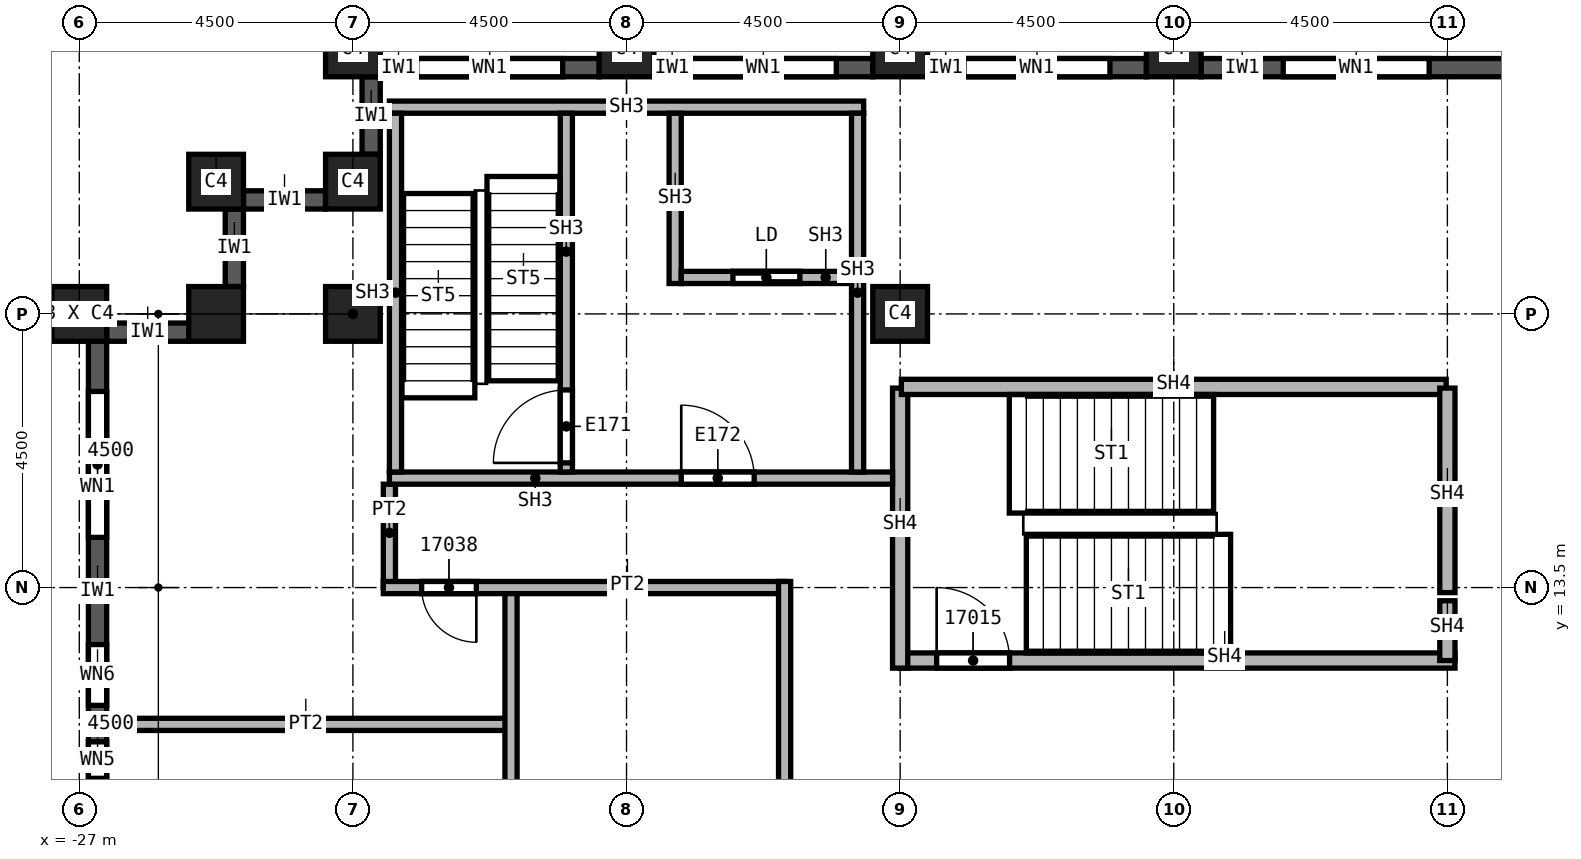
"""IFC4 building model, lengths in metres.
Left out: names, types, materials, properties, quantities, classifications, styles, units other than length and angle.
Written with IfcOpenShell. Run it as: python <this file> out.ifc"""

import sys

from ifc_helpers import new_model, si_unit, direction, frame, frame_2d, origin, origin_2d, place, context, subcontext, project, spatial, rectangle, extrude, element, fill, save


model = new_model("IFC4")
c1 = context("Model", 3, precision=1e-05, world=origin(), true_north=direction((0.0, 1.0)))
c2 = subcontext(c1, "Body", "Model", "MODEL_VIEW")
j1 = project(units=[si_unit("LENGTHUNIT", "METRE"), si_unit("PLANEANGLEUNIT", "RADIAN")], contexts=[c1])
p1 = place(None, origin())
s1 = spatial("IfcSite", under=j1, at=p1, CompositionType="ELEMENT")
p2 = place(p1, origin())
s2 = spatial("IfcBuilding", under=s1, at=p2, CompositionType="ELEMENT")
p3 = place(p2, frame((0.0, 0.0, 254.0)))
s3 = spatial("IfcBuildingStorey", under=s2, at=p3, CompositionType="ELEMENT", Elevation=254.0)
for number, where, z_axis, x_axis in (
    (1, (-13.5, 18.0, 0.0), (0.0, 0.0, 1.0), (1.0, 0.0, 0.0)),
    (2, (-22.5, 18.0, 0.0), (0.0, 0.0, 1.0), (1.0, 0.0, 0.0)),
    (3, (-9.0, 22.35, 0.0), (0.0, 0.0, 1.0), (1.0, 0.0, 0.0)),
    (4, (-13.5, 22.35, 0.0), (0.0, 0.0, 1.0), (1.0, 0.0, 0.0)),
    (5, (-18.0, 22.35, 0.0), (0.0, 0.0, 1.0), (1.0, 0.0, 0.0)),
    (6, (-22.5, 22.35, 0.0), (0.0, 0.0, 1.0), (1.0, 0.0, 0.0)),
    (7, (-27.0, 18.0, 0.0), (0.0, 0.0, 1.0), (0.0, 1.0, 0.0)),
    (8, (-22.5, 20.175, 0.0), (0.0, 0.0, 1.0), (1.0, 0.0, 0.0)),
    (9, (-24.75, 20.175, 0.0), (0.0, 0.0, 1.0), (1.0, 0.0, 0.0)),
    (10, (-24.75, 18.0, 0.0), (0.0, 0.0, 1.0), (1.0, 0.0, 0.0)),
):
    element("IfcColumn", number, at=place(p3, frame(where, z_axis=z_axis, x_axis=x_axis)), inside=s3, PredefinedType="COLUMN", context=c2, shape_type="SweptSolid", body=[
        extrude(rectangle(XDim=0.9, YDim=0.9, at=origin_2d()), origin(), (0.0, 0.0, 1.0), 3.72),
    ])
p4 = place(p3, frame((-24.45, 19.725, 0.0), z_axis=(0.0, 0.0, 1.0), x_axis=(0.0, -1.0, 0.0)))
e11 = element("IfcWall", 11, at=p4, inside=s3, PredefinedType="SOLIDWALL", context=c2, shape_type="SweptSolid", body=[
    extrude(rectangle(XDim=1.275, YDim=0.3, at=frame_2d((0.638, 0.0))), origin(), (0.0, 0.0, 1.0), 3.12),
])
p5 = place(p3, frame((-25.2, 17.7, 0.0), z_axis=(0.0, 0.0, 1.0), x_axis=(-1.0, 0.0, 0.0)))
e12 = element("IfcWall", 12, at=p5, inside=s3, PredefinedType="SOLIDWALL", context=c2, shape_type="SweptSolid", body=[
    extrude(rectangle(XDim=1.35, YDim=0.3, at=frame_2d((0.675, 0.0))), origin(), (0.0, 0.0, 1.0), 3.12),
])
p6 = place(p3, frame((-26.7, 17.55, 0.0), z_axis=(0.0, 0.0, 1.0), x_axis=(0.0, -1.0, 0.0)))
e13 = element("IfcWall", 13, at=p6, inside=s3, PredefinedType="SOLIDWALL", context=c2, shape_type="SweptSolid", body=[
    extrude(rectangle(XDim=8.1, YDim=0.3, at=frame_2d((4.05, 0.0))), origin(), (0.0, 0.0, 1.0), 3.12),
])
p7 = place(p6, frame((0.825, 0.0, 0.8)))
e14 = element("IfcOpeningElement", 14, at=p7, cuts=e13, PredefinedType="OPENING", context=c2, shape_type="SweptSolid", body=[
    extrude(rectangle(XDim=2.4, YDim=1.95, at=frame_2d((1.2, 0.975))), frame((0.0, 0.15, 0.0), z_axis=(0.0, -1.0, 0.0), x_axis=(1.0, 0.0, 0.0)), (0.0, 0.0, 1.0), 0.3),
])
p8 = place(p6, frame((4.988, 0.0, 0.8)))
e15 = element("IfcOpeningElement", 15, at=p8, cuts=e13, PredefinedType="OPENING", context=c2, shape_type="SweptSolid", body=[
    extrude(rectangle(XDim=1.0, YDim=1.95, at=frame_2d((0.5, 0.975))), frame((0.0, 0.15, 0.0), z_axis=(0.0, -1.0, 0.0), x_axis=(1.0, 0.0, 0.0)), (0.0, 0.0, 1.0), 0.3),
])
p9 = place(p6, frame((6.587, 0.0, 0.8)))
e16 = element("IfcOpeningElement", 16, at=p9, cuts=e13, PredefinedType="OPENING", context=c2, shape_type="SweptSolid", body=[
    extrude(rectangle(XDim=0.6, YDim=1.95, at=frame_2d((0.3, 0.975))), frame((0.0, 0.15, 0.0), z_axis=(0.0, -1.0, 0.0), x_axis=(1.0, 0.0, 0.0)), (0.0, 0.0, 1.0), 0.3),
])
p10 = place(p3, frame((-3.45, 22.05, 0.0), z_axis=(0.0, 0.0, 1.0), x_axis=(-1.0, 0.0, 0.0)))
e17 = element("IfcWall", 17, at=p10, inside=s3, PredefinedType="SOLIDWALL", context=c2, shape_type="SweptSolid", body=[
    extrude(rectangle(XDim=5.1, YDim=0.3, at=frame_2d((2.55, 0.0))), origin(), (0.0, 0.0, 1.0), 3.12),
])
p11 = place(p10, frame((1.35, 0.0, 0.8)))
e18 = element("IfcOpeningElement", 18, at=p11, cuts=e17, PredefinedType="OPENING", context=c2, shape_type="SweptSolid", body=[
    extrude(rectangle(XDim=2.4, YDim=1.95, at=frame_2d((1.2, 0.975))), frame((0.0, 0.15, 0.0), z_axis=(0.0, -1.0, 0.0), x_axis=(1.0, 0.0, 0.0)), (0.0, 0.0, 1.0), 0.3),
])
p12 = place(p3, frame((-9.45, 22.05, 0.0), z_axis=(0.0, 0.0, 1.0), x_axis=(-1.0, 0.0, 0.0)))
e19 = element("IfcWall", 19, at=p12, inside=s3, PredefinedType="SOLIDWALL", context=c2, shape_type="SweptSolid", body=[
    extrude(rectangle(XDim=3.6, YDim=0.3, at=frame_2d((1.8, 0.0))), origin(), (0.0, 0.0, 1.0), 3.12),
])
p13 = place(p12, frame((0.6, 0.0, 0.8)))
e20 = element("IfcOpeningElement", 20, at=p13, cuts=e19, PredefinedType="OPENING", context=c2, shape_type="SweptSolid", body=[
    extrude(rectangle(XDim=2.4, YDim=1.95, at=frame_2d((1.2, 0.975))), frame((0.0, 0.15, 0.0), z_axis=(0.0, -1.0, 0.0), x_axis=(1.0, 0.0, 0.0)), (0.0, 0.0, 1.0), 0.3),
])
p14 = place(p3, frame((-13.95, 22.05, 0.0), z_axis=(0.0, 0.0, 1.0), x_axis=(-1.0, 0.0, 0.0)))
e21 = element("IfcWall", 21, at=p14, inside=s3, PredefinedType="SOLIDWALL", context=c2, shape_type="SweptSolid", body=[
    extrude(rectangle(XDim=3.6, YDim=0.3, at=frame_2d((1.8, 0.0))), origin(), (0.0, 0.0, 1.0), 3.12),
])
p15 = place(p14, frame((0.6, 0.0, 0.8)))
e22 = element("IfcOpeningElement", 22, at=p15, cuts=e21, PredefinedType="OPENING", context=c2, shape_type="SweptSolid", body=[
    extrude(rectangle(XDim=2.4, YDim=1.95, at=frame_2d((1.2, 0.975))), frame((0.0, 0.15, 0.0), z_axis=(0.0, -1.0, 0.0), x_axis=(1.0, 0.0, 0.0)), (0.0, 0.0, 1.0), 0.3),
])
p16 = place(p3, frame((-18.45, 22.05, 0.0), z_axis=(0.0, 0.0, 1.0), x_axis=(-1.0, 0.0, 0.0)))
e23 = element("IfcWall", 23, at=p16, inside=s3, PredefinedType="SOLIDWALL", context=c2, shape_type="SweptSolid", body=[
    extrude(rectangle(XDim=3.6, YDim=0.3, at=frame_2d((1.8, 0.0))), origin(), (0.0, 0.0, 1.0), 3.12),
])
p17 = place(p16, frame((0.6, 0.0, 0.8)))
e24 = element("IfcOpeningElement", 24, at=p17, cuts=e23, PredefinedType="OPENING", context=c2, shape_type="SweptSolid", body=[
    extrude(rectangle(XDim=2.4, YDim=1.95, at=frame_2d((1.2, 0.975))), frame((0.0, 0.15, 0.0), z_axis=(0.0, -1.0, 0.0), x_axis=(1.0, 0.0, 0.0)), (0.0, 0.0, 1.0), 0.3),
])
p18 = place(p3, frame((-22.2, 21.9, 0.0), z_axis=(0.0, 0.0, 1.0), x_axis=(0.0, -1.0, 0.0)))
e25 = element("IfcWall", 25, at=p18, inside=s3, PredefinedType="SOLIDWALL", context=c2, shape_type="SweptSolid", body=[
    extrude(rectangle(XDim=1.275, YDim=0.3, at=frame_2d((0.637, 0.0))), origin(), (0.0, 0.0, 1.0), 3.12),
])
p19 = place(p3, frame((-22.95, 19.875, 0.0), z_axis=(0.0, 0.0, 1.0), x_axis=(-1.0, 0.0, 0.0)))
e26 = element("IfcWall", 26, at=p19, inside=s3, PredefinedType="SOLIDWALL", context=c2, shape_type="SweptSolid", body=[
    extrude(rectangle(XDim=1.35, YDim=0.3, at=frame_2d((0.675, 0.0))), origin(), (0.0, 0.0, 1.0), 3.12),
])
p20 = place(p3, frame((-26.55, 11.25, 0.0), z_axis=(0.0, 0.0, 1.0), x_axis=(1.0, 0.0, 0.0)))
e27 = element("IfcWall", 27, at=p20, inside=s3, PredefinedType="PARTITIONING", context=c2, shape_type="SweptSolid", body=[
    extrude(rectangle(XDim=6.65, YDim=0.2, at=frame_2d((3.325, 0.0))), origin(), (0.0, 0.0, 1.0), 3.72),
])
p21 = place(p3, frame((-21.9, 13.5, 0.0), z_axis=(0.0, 0.0, 1.0), x_axis=(0.0, 1.0, 0.0)))
e28 = element("IfcWall", 28, at=p21, inside=s3, PredefinedType="PARTITIONING", context=c2, shape_type="SweptSolid", body=[
    extrude(rectangle(XDim=1.7, YDim=0.2, at=frame_2d((0.85, 0.0))), origin(), (0.0, 0.0, 1.0), 3.72),
])
p22 = place(p3, frame((-19.9, -13.5, 0.0), z_axis=(0.0, 0.0, 1.0), x_axis=(0.0, 1.0, 0.0)))
e29 = element("IfcWall", 29, at=p22, inside=s3, PredefinedType="PARTITIONING", context=c2, shape_type="SweptSolid", body=[
    extrude(rectangle(XDim=27.0, YDim=0.2, at=frame_2d((13.5, 0.0))), origin(), (0.0, 0.0, 1.0), 3.72),
])
p23 = place(p22, frame((21.3, 0.0, 0.0)))
e30 = element("IfcOpeningElement", 30, at=p23, cuts=e29, PredefinedType="OPENING", context=c2, shape_type="SweptSolid", body=[
    extrude(rectangle(XDim=1.0, YDim=2.1, at=frame_2d((0.5, 1.05))), frame((0.0, 0.1, 0.0), z_axis=(0.0, -1.0, 0.0), x_axis=(1.0, 0.0, 0.0)), (0.0, 0.0, 1.0), 0.2),
])
p24 = place(p22, frame((0.25, 0.0, 0.0)))
e31 = element("IfcOpeningElement", 31, at=p24, cuts=e29, PredefinedType="OPENING", context=c2, shape_type="SweptSolid", body=[
    extrude(rectangle(XDim=1.0, YDim=2.1, at=frame_2d((0.5, 1.05))), frame((0.0, 0.1, 0.0), z_axis=(0.0, -1.0, 0.0), x_axis=(1.0, 0.0, 0.0)), (0.0, 0.0, 1.0), 0.2),
])
p25 = place(p3, frame((-15.4, 13.5, 0.0), z_axis=(0.0, 0.0, 1.0), x_axis=(-1.0, 0.0, 0.0)))
e32 = element("IfcWall", 32, at=p25, inside=s3, PredefinedType="PARTITIONING", context=c2, shape_type="SweptSolid", body=[
    extrude(rectangle(XDim=6.6, YDim=0.2, at=frame_2d((3.3, 0.0))), origin(), (0.0, 0.0, 1.0), 3.72),
])
p26 = place(p25, frame((5.07, 0.0, 0.0)))
e33 = element("IfcOpeningElement", 33, at=p26, cuts=e32, PredefinedType="OPENING", context=c2, shape_type="SweptSolid", body=[
    extrude(rectangle(XDim=0.9, YDim=2.1, at=frame_2d((0.45, 1.05))), frame((0.0, 0.1, 0.0), z_axis=(0.0, -1.0, 0.0), x_axis=(1.0, 0.0, 0.0)), (0.0, 0.0, 1.0), 0.2),
])
p27 = place(p3, frame((-15.4, -21.9, 0.0), z_axis=(0.0, 0.0, 1.0), x_axis=(0.0, 1.0, 0.0)))
e34 = element("IfcWall", 34, at=p27, inside=s3, PredefinedType="PARTITIONING", context=c2, shape_type="SweptSolid", body=[
    extrude(rectangle(XDim=35.5, YDim=0.2, at=frame_2d((17.75, 0.0))), origin(), (0.0, 0.0, 1.0), 3.72),
])
p28 = place(p27, frame((24.3, 0.0, 0.0)))
e35 = element("IfcOpeningElement", 35, at=p28, cuts=e34, PredefinedType="OPENING", context=c2, shape_type="SweptSolid", body=[
    extrude(rectangle(XDim=1.0, YDim=2.1, at=frame_2d((0.5, 1.05))), frame((0.0, 0.1, 0.0), z_axis=(0.0, -1.0, 0.0), x_axis=(1.0, 0.0, 0.0)), (0.0, 0.0, 1.0), 0.2),
])
p29 = place(p27, frame((2.35, 0.0, 0.0)))
e36 = element("IfcOpeningElement", 36, at=p29, cuts=e34, PredefinedType="OPENING", context=c2, shape_type="SweptSolid", body=[
    extrude(rectangle(XDim=1.0, YDim=2.1, at=frame_2d((0.5, 1.05))), frame((0.0, 0.1, 0.0), z_axis=(0.0, -1.0, 0.0), x_axis=(1.0, 0.0, 0.0)), (0.0, 0.0, 1.0), 0.2),
])
p30 = place(p27, frame((5.7, 0.0, 0.0)))
e37 = element("IfcOpeningElement", 37, at=p30, cuts=e34, PredefinedType="OPENING", context=c2, shape_type="SweptSolid", body=[
    extrude(rectangle(XDim=1.0, YDim=2.1, at=frame_2d((0.5, 1.05))), frame((0.0, 0.1, 0.0), z_axis=(0.0, -1.0, 0.0), x_axis=(1.0, 0.0, 0.0)), (0.0, 0.0, 1.0), 0.2),
])
p31 = place(p27, frame((10.35, 0.0, 0.0)))
e38 = element("IfcOpeningElement", 38, at=p31, cuts=e34, PredefinedType="OPENING", context=c2, shape_type="SweptSolid", body=[
    extrude(rectangle(XDim=1.0, YDim=2.1, at=frame_2d((0.5, 1.05))), frame((0.0, 0.1, 0.0), z_axis=(0.0, -1.0, 0.0), x_axis=(1.0, 0.0, 0.0)), (0.0, 0.0, 1.0), 0.2),
])
p32 = place(p27, frame((16.2, 0.0, 0.0)))
e39 = element("IfcOpeningElement", 39, at=p32, cuts=e34, PredefinedType="OPENING", context=c2, shape_type="SweptSolid", body=[
    extrude(rectangle(XDim=1.0, YDim=2.1, at=frame_2d((0.5, 1.05))), frame((0.0, 0.1, 0.0), z_axis=(0.0, -1.0, 0.0), x_axis=(1.0, 0.0, 0.0)), (0.0, 0.0, 1.0), 0.2),
])
p33 = place(p3, frame((-13.5, 12.3, 0.0), z_axis=(0.0, 0.0, 1.0), x_axis=(1.0, 0.0, 0.0)))
e40 = element("IfcWall", 40, at=p33, inside=s3, PredefinedType="SOLIDWALL", context=c2, shape_type="SweptSolid", body=[
    extrude(rectangle(XDim=9.125, YDim=0.25, at=frame_2d((4.562, 0.0))), origin(), (0.0, 0.0, 1.0), 3.72),
])
p34 = place(p33, frame((0.6, 0.0, 0.0)))
e41 = element("IfcOpeningElement", 41, at=p34, cuts=e40, PredefinedType="OPENING", context=c2, shape_type="SweptSolid", body=[
    extrude(rectangle(XDim=1.2, YDim=2.1, at=frame_2d((0.6, 1.05))), frame((0.0, 0.125, 0.0), z_axis=(0.0, -1.0, 0.0), x_axis=(1.0, 0.0, 0.0)), (0.0, 0.0, 1.0), 0.25),
])
p35 = place(p3, frame((-13.5, 16.78, 0.0), z_axis=(0.0, 0.0, 1.0), x_axis=(0.0, -1.0, 0.0)))
e42 = element("IfcWall", 42, at=p35, inside=s3, PredefinedType="SOLIDWALL", context=c2, shape_type="SweptSolid", body=[
    extrude(rectangle(XDim=4.605, YDim=0.25, at=frame_2d((2.302, 0.0))), origin(), (0.0, 0.0, 1.0), 3.72),
])
p36 = place(p3, frame((-13.48, 16.8, 0.0), z_axis=(0.0, 0.0, 1.0), x_axis=(1.0, 0.0, 0.0)))
e43 = element("IfcWall", 43, at=p36, inside=s3, PredefinedType="SOLIDWALL", context=c2, shape_type="SweptSolid", body=[
    extrude(rectangle(XDim=8.96, YDim=0.25, at=frame_2d((4.48, 0.0))), origin(), (0.0, 0.0, 1.0), 3.72),
])
p37 = place(p3, frame((-4.5, 13.283, 0.0), z_axis=(0.0, 0.0, 1.0), x_axis=(0.0, -1.0, 0.0)))
e44 = element("IfcWall", 44, at=p37, inside=s3, PredefinedType="SOLIDWALL", context=c2, shape_type="SweptSolid", body=[
    extrude(rectangle(XDim=0.983, YDim=0.25, at=frame_2d((0.491, 0.0))), origin(), (0.0, 0.0, 1.0), 3.72),
])
p38 = place(p3, frame((-4.5, 16.78, 0.0), z_axis=(0.0, 0.0, 1.0), x_axis=(0.0, -1.0, 0.0)))
e45 = element("IfcWall", 45, at=p38, inside=s3, PredefinedType="SOLIDWALL", context=c2, shape_type="SweptSolid", body=[
    extrude(rectangle(XDim=3.363, YDim=0.25, at=frame_2d((1.682, 0.0))), origin(), (0.0, 0.0, 1.0), 3.72),
])
p39 = place(p3, frame((-21.9, 15.3, 0.0), z_axis=(0.0, 0.0, 1.0), x_axis=(1.0, 0.0, 0.0)))
e46 = element("IfcWall", 46, at=p39, inside=s3, PredefinedType="SOLIDWALL", context=c2, shape_type="SweptSolid", body=[
    extrude(rectangle(XDim=8.275, YDim=0.2, at=frame_2d((4.137, 0.0))), origin(), (0.0, 0.0, 1.0), 3.72),
])
p40 = place(p39, frame((4.8, 0.0, 0.0)))
e47 = element("IfcOpeningElement", 47, at=p40, cuts=e46, PredefinedType="OPENING", context=c2, shape_type="SweptSolid", body=[
    extrude(rectangle(XDim=1.2, YDim=2.1, at=frame_2d((0.6, 1.05))), frame((0.0, 0.1, 0.0), z_axis=(0.0, -1.0, 0.0), x_axis=(1.0, 0.0, 0.0)), (0.0, 0.0, 1.0), 0.2),
])
p41 = place(p3, frame((-21.9, 21.4, 0.0), z_axis=(0.0, 0.0, 1.0), x_axis=(1.0, 0.0, 0.0)))
e48 = element("IfcWall", 48, at=p41, inside=s3, PredefinedType="SOLIDWALL", context=c2, shape_type="SweptSolid", body=[
    extrude(rectangle(XDim=7.8, YDim=0.2, at=frame_2d((3.9, 0.0))), origin(), (0.0, 0.0, 1.0), 3.72),
])
for number, where, z_axis, x_axis in (
    (49, (-21.8, 15.4, 0.0), (0.0, 0.0, 1.0), (0.0, 1.0, 0.0)),
    (50, (-14.2, 15.4, 0.0), (0.0, 0.0, 1.0), (0.0, 1.0, 0.0)),
):
    element("IfcWall", number, at=place(p3, frame(where, z_axis=z_axis, x_axis=x_axis)), inside=s3, PredefinedType="SOLIDWALL", context=c2, shape_type="SweptSolid", body=[
        extrude(rectangle(XDim=5.9, YDim=0.2, at=frame_2d((2.95, 0.0))), origin(), (0.0, 0.0, 1.0), 3.72),
    ])
p42 = place(p3, frame((-18.99, 15.4, 0.0), z_axis=(0.0, 0.0, 1.0), x_axis=(0.0, 1.0, 0.0)))
e51 = element("IfcWall", 51, at=p42, inside=s3, PredefinedType="SOLIDWALL", context=c2, shape_type="SweptSolid", body=[
    extrude(rectangle(XDim=5.9, YDim=0.2, at=frame_2d((2.95, 0.0))), origin(), (0.0, 0.0, 1.0), 3.72),
])
p43 = place(p42, frame((0.15, 0.0, 0.0)))
e52 = element("IfcOpeningElement", 52, at=p43, cuts=e51, PredefinedType="OPENING", context=c2, shape_type="SweptSolid", body=[
    extrude(rectangle(XDim=1.2, YDim=2.1, at=frame_2d((0.6, 1.05))), frame((0.0, 0.1, 0.0), z_axis=(0.0, -1.0, 0.0), x_axis=(1.0, 0.0, 0.0)), (0.0, 0.0, 1.0), 0.2),
])
p44 = place(p3, frame((-17.2, 18.5, 0.0), z_axis=(0.0, 0.0, 1.0), x_axis=(0.0, 1.0, 0.0)))
e53 = element("IfcWall", 53, at=p44, inside=s3, PredefinedType="SOLIDWALL", context=c2, shape_type="SweptSolid", body=[
    extrude(rectangle(XDim=2.8, YDim=0.2, at=frame_2d((1.4, 0.0))), origin(), (0.0, 0.0, 1.0), 3.72),
])
p45 = place(p3, frame((-17.1, 18.6, 0.0), z_axis=(0.0, 0.0, 1.0), x_axis=(1.0, 0.0, 0.0)))
e54 = element("IfcWall", 54, at=p45, inside=s3, PredefinedType="SOLIDWALL", context=c2, shape_type="SweptSolid", body=[
    extrude(rectangle(XDim=2.8, YDim=0.2, at=frame_2d((1.4, 0.0))), origin(), (0.0, 0.0, 1.0), 3.72),
])
p46 = place(p45, frame((0.85, 0.0, 0.0)))
e55 = element("IfcOpeningElement", 55, at=p46, cuts=e54, PredefinedType="OPENING", context=c2, shape_type="SweptSolid", body=[
    extrude(rectangle(XDim=1.1, YDim=2.1, at=frame_2d((0.55, 1.05))), frame((0.0, 0.1, 0.0), z_axis=(0.0, -1.0, 0.0), x_axis=(1.0, 0.0, 0.0)), (0.0, 0.0, 1.0), 0.2),
])
p47 = place(p7, origin())
e56 = element("IfcWindow", 56, at=p47, inside=s3, PartitioningType="SINGLE_PANEL", PredefinedType="WINDOW", context=c2, shape_type="SweptSolid", body=[
    extrude(rectangle(XDim=2.4, YDim=1.95, at=frame_2d((1.2, 0.975))), frame((0.0, 0.03, 0.0), z_axis=(0.0, -1.0, 0.0), x_axis=(1.0, 0.0, 0.0)), (0.0, 0.0, 1.0), 0.06),
])
fill(e14, e56)
p48 = place(p11, origin())
e57 = element("IfcWindow", 57, at=p48, inside=s3, PartitioningType="SINGLE_PANEL", PredefinedType="WINDOW", context=c2, shape_type="SweptSolid", body=[
    extrude(rectangle(XDim=2.4, YDim=1.95, at=frame_2d((1.2, 0.975))), frame((0.0, 0.03, 0.0), z_axis=(0.0, -1.0, 0.0), x_axis=(1.0, 0.0, 0.0)), (0.0, 0.0, 1.0), 0.06),
])
fill(e18, e57)
p49 = place(p13, origin())
e58 = element("IfcWindow", 58, at=p49, inside=s3, PartitioningType="SINGLE_PANEL", PredefinedType="WINDOW", context=c2, shape_type="SweptSolid", body=[
    extrude(rectangle(XDim=2.4, YDim=1.95, at=frame_2d((1.2, 0.975))), frame((0.0, 0.03, 0.0), z_axis=(0.0, -1.0, 0.0), x_axis=(1.0, 0.0, 0.0)), (0.0, 0.0, 1.0), 0.06),
])
fill(e20, e58)
p50 = place(p15, origin())
e59 = element("IfcWindow", 59, at=p50, inside=s3, PartitioningType="SINGLE_PANEL", PredefinedType="WINDOW", context=c2, shape_type="SweptSolid", body=[
    extrude(rectangle(XDim=2.4, YDim=1.95, at=frame_2d((1.2, 0.975))), frame((0.0, 0.03, 0.0), z_axis=(0.0, -1.0, 0.0), x_axis=(1.0, 0.0, 0.0)), (0.0, 0.0, 1.0), 0.06),
])
fill(e22, e59)
p51 = place(p17, origin())
e60 = element("IfcWindow", 60, at=p51, inside=s3, PartitioningType="SINGLE_PANEL", PredefinedType="WINDOW", context=c2, shape_type="SweptSolid", body=[
    extrude(rectangle(XDim=2.4, YDim=1.95, at=frame_2d((1.2, 0.975))), frame((0.0, 0.03, 0.0), z_axis=(0.0, -1.0, 0.0), x_axis=(1.0, 0.0, 0.0)), (0.0, 0.0, 1.0), 0.06),
])
fill(e24, e60)
p52 = place(p34, origin())
e61 = element("IfcDoor", 61, at=p52, inside=s3, OperationType="SINGLE_SWING_RIGHT", PredefinedType="DOOR", context=c2, shape_type="SweptSolid", body=[
    extrude(rectangle(XDim=1.2, YDim=2.1, at=frame_2d((0.6, 1.05))), frame((0.0, 0.025, 0.0), z_axis=(0.0, -1.0, 0.0), x_axis=(1.0, 0.0, 0.0)), (0.0, 0.0, 1.0), 0.05),
])
fill(e41, e61)
p53 = place(p26, origin())
e62 = element("IfcDoor", 62, at=p53, inside=s3, OperationType="SINGLE_SWING_LEFT", PredefinedType="DOOR", context=c2, shape_type="SweptSolid", body=[
    extrude(rectangle(XDim=0.9, YDim=2.1, at=frame_2d((0.45, 1.05))), frame((0.0, 0.025, 0.0), z_axis=(0.0, -1.0, 0.0), x_axis=(1.0, 0.0, 0.0)), (0.0, 0.0, 1.0), 0.05),
])
fill(e33, e62)
p54 = place(p43, origin())
e63 = element("IfcDoor", 63, at=p54, inside=s3, OperationType="SINGLE_SWING_LEFT", PredefinedType="DOOR", context=c2, shape_type="SweptSolid", body=[
    extrude(rectangle(XDim=1.2, YDim=2.1, at=frame_2d((0.6, 1.05))), frame((0.0, 0.025, 0.0), z_axis=(0.0, -1.0, 0.0), x_axis=(1.0, 0.0, 0.0)), (0.0, 0.0, 1.0), 0.05),
])
fill(e52, e63)
p55 = place(p46, origin())
e64 = element("IfcDoor", 64, at=p55, inside=s3, OperationType="SLIDING_TO_LEFT", PredefinedType="DOOR", context=c2, shape_type="SweptSolid", body=[
    extrude(rectangle(XDim=1.1, YDim=2.1, at=frame_2d((0.55, 1.05))), frame((0.0, 0.025, 0.0), z_axis=(0.0, -1.0, 0.0), x_axis=(1.0, 0.0, 0.0)), (0.0, 0.0, 1.0), 0.05),
])
fill(e55, e64)
p56 = place(p40, origin())
e65 = element("IfcDoor", 65, at=p56, inside=s3, OperationType="SINGLE_SWING_RIGHT", PredefinedType="DOOR", context=c2, shape_type="SweptSolid", body=[
    extrude(rectangle(XDim=1.2, YDim=2.1, at=frame_2d((0.6, 1.05))), frame((0.0, 0.025, 0.0), z_axis=(0.0, -1.0, 0.0), x_axis=(1.0, 0.0, 0.0)), (0.0, 0.0, 1.0), 0.05),
])
fill(e47, e65)
p57 = place(p8, origin())
e66 = element("IfcWindow", 66, at=p57, inside=s3, PartitioningType="SINGLE_PANEL", PredefinedType="WINDOW", context=c2, shape_type="SweptSolid", body=[
    extrude(rectangle(XDim=1.0, YDim=1.95, at=frame_2d((0.5, 0.975))), frame((0.0, 0.03, 0.0), z_axis=(0.0, -1.0, 0.0), x_axis=(1.0, 0.0, 0.0)), (0.0, 0.0, 1.0), 0.06),
])
fill(e15, e66)
p58 = place(p9, origin())
e67 = element("IfcWindow", 67, at=p58, inside=s3, PartitioningType="SINGLE_PANEL", PredefinedType="WINDOW", context=c2, shape_type="SweptSolid", body=[
    extrude(rectangle(XDim=0.6, YDim=1.95, at=frame_2d((0.3, 0.975))), frame((0.0, 0.03, 0.0), z_axis=(0.0, -1.0, 0.0), x_axis=(1.0, 0.0, 0.0)), (0.0, 0.0, 1.0), 0.06),
])
fill(e16, e67)
save(model, sys.argv[1])
